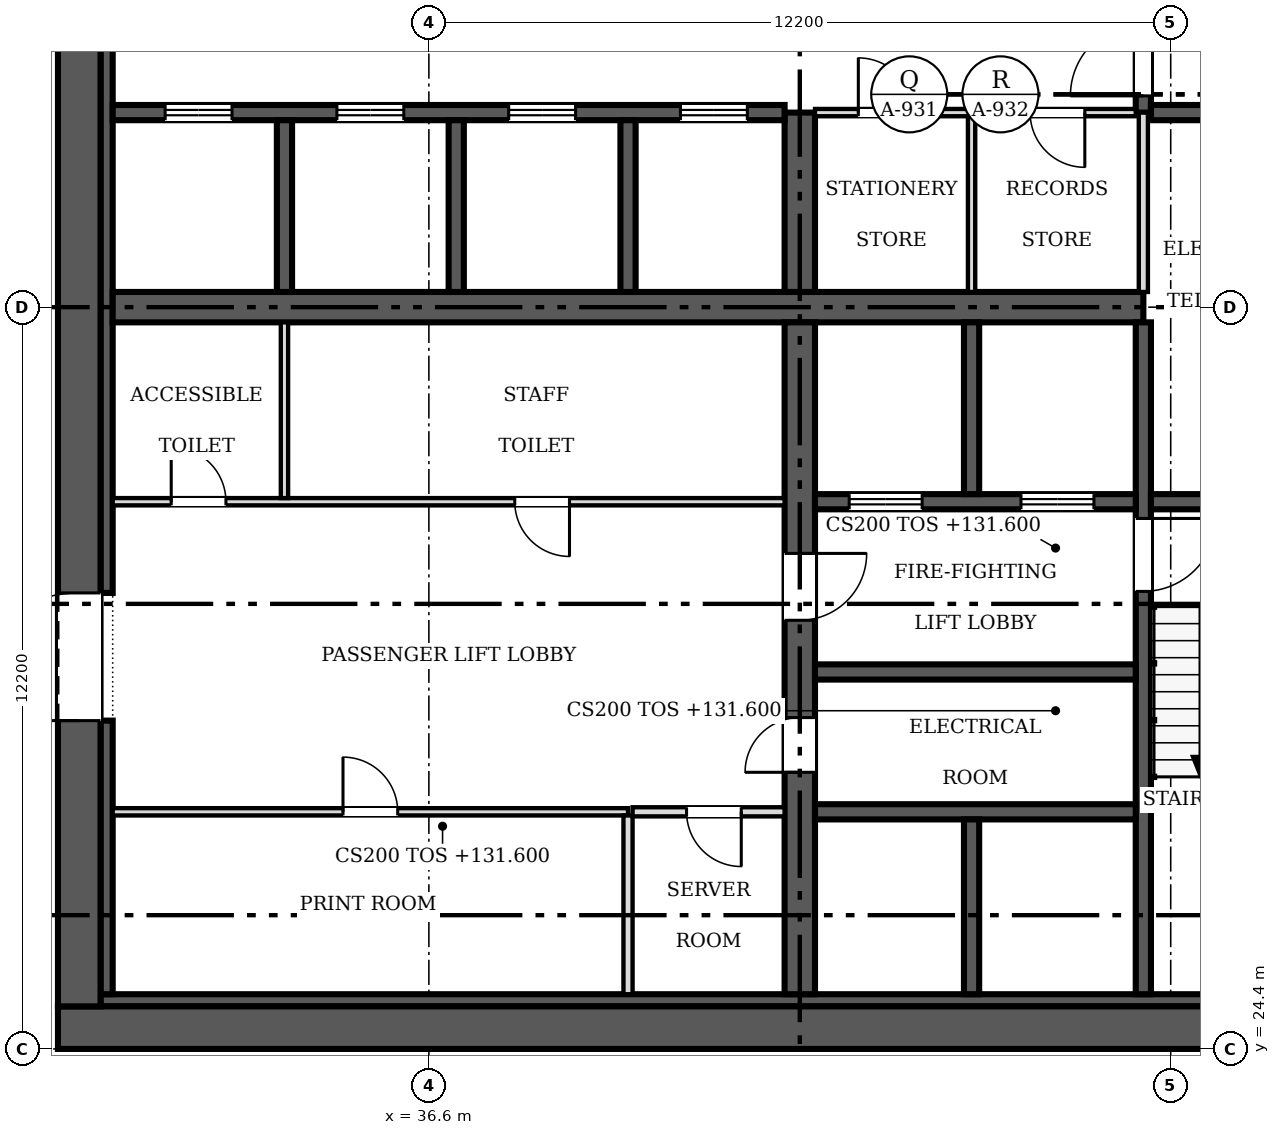
"""IFC4 building model, lengths in metres.
Left out: names, types, materials, properties, quantities, classifications, styles, units other than length and angle.
Written with IfcOpenShell. Run it as: python <this file> out.ifc"""

import sys

from ifc_helpers import new_model, si_unit, direction, frame, frame_2d, origin, place, context, subcontext, project, spatial, rectangle, extrude, source, transform, mapped, element, fill, save


model = new_model("IFC4")
c1 = context("Model", 3, precision=1e-05, world=origin(), true_north=direction((0.0, 1.0)))
c2 = subcontext(c1, "Body", "Model", "MODEL_VIEW")
j1 = project(units=[si_unit("LENGTHUNIT", "METRE"), si_unit("PLANEANGLEUNIT", "RADIAN")], contexts=[c1])
p1 = place(None, origin())
s1 = spatial("IfcSite", under=j1, at=p1, CompositionType="ELEMENT")
p2 = place(p1, origin())
s2 = spatial("IfcBuilding", under=s1, at=p2, CompositionType="ELEMENT")
p3 = place(p2, frame((0.0, 0.0, 131.6)))
s3 = spatial("IfcBuildingStorey", under=s2, at=p3, CompositionType="ELEMENT", Elevation=131.6)
p4 = place(p3, frame((54.9, 24.75, 0.0), z_axis=(0.0, 0.0, 1.0), x_axis=(-1.0, 0.0, 0.0)))
e1 = element("IfcWall", 1, at=p4, inside=s3, PredefinedType="SHEAR", context=c2, shape_type="SweptSolid", body=[
    extrude(rectangle(XDim=24.4, YDim=0.7, at=frame_2d((12.2, 0.0))), origin(), (0.0, 0.0, 1.0), 3.8),
])
m1 = source(origin(), c2, "Body", "SweptSolid", [
    extrude(rectangle(XDim=1.2, YDim=2.1, at=frame_2d((0.6, 1.05))), frame((0.0, 0.36, 0.0), z_axis=(0.0, -1.0, 0.0), x_axis=(1.0, 0.0, 0.0)), (0.0, 0.0, 1.0), 0.72),
])
p5 = place(p4, frame((1.5, 0.0, 0.0)))
e2 = element("IfcOpeningElement", 2, at=p5, cuts=e1, PredefinedType="OPENING", context=c2, shape_type="MappedRepresentation", body=[
    mapped(m1, transform((0.0, 0.0, 0.0), scale=1.0)),
])
p6 = place(p3, frame((30.85, 25.1, 0.0), z_axis=(0.0, 0.0, 1.0), x_axis=(0.0, 1.0, 0.0)))
e3 = element("IfcWall", 3, at=p6, inside=s3, PredefinedType="SHEAR", context=c2, shape_type="SweptSolid", body=[
    extrude(rectangle(XDim=23.0, YDim=0.7, at=frame_2d((11.5, 0.0))), origin(), (0.0, 0.0, 1.0), 3.8),
])
m2 = source(origin(), c2, "Body", "SweptSolid", [
    extrude(rectangle(XDim=2.1, YDim=2.4, at=frame_2d((1.05, 1.2))), frame((0.0, 0.36, 0.0), z_axis=(0.0, -1.0, 0.0), x_axis=(1.0, 0.0, 0.0)), (0.0, 0.0, 1.0), 0.72),
])
p7 = place(p6, frame((4.7, 0.0, 0.0)))
e4 = element("IfcOpeningElement", 4, at=p7, cuts=e3, PredefinedType="OPENING", context=c2, shape_type="MappedRepresentation", body=[
    mapped(m2, transform((0.0, 0.0, 0.0), scale=1.0)),
])
p8 = place(p6, frame((16.2, 0.0, 0.0)))
e5 = element("IfcOpeningElement", 5, at=p8, cuts=e3, PredefinedType="OPENING", context=c2, shape_type="MappedRepresentation", body=[
    mapped(m2, transform((0.0, 0.0, 0.0), scale=1.0)),
])
p9 = place(p3, frame((31.2, 25.2, 0.0), z_axis=(0.0, 0.0, 1.0), x_axis=(1.0, 0.0, 0.0)))
e6 = element("IfcWall", 6, at=p9, inside=s3, PredefinedType="SOLIDWALL", context=c2, shape_type="SweptSolid", body=[
    extrude(rectangle(XDim=21.0, YDim=0.2, at=frame_2d((10.5, 0.0))), origin(), (0.0, 0.0, 1.0), 3.8),
])
p10 = place(p3, frame((31.3, 25.3, 0.0), z_axis=(0.0, 0.0, 1.0), x_axis=(0.0, 1.0, 0.0)))
e7 = element("IfcWall", 7, at=p10, inside=s3, PredefinedType="SOLIDWALL", context=c2, shape_type="SweptSolid", body=[
    extrude(rectangle(XDim=4.5, YDim=0.2, at=frame_2d((2.25, 0.0))), origin(), (0.0, 0.0, 1.0), 3.8),
])
p11 = place(p3, frame((31.3, 31.9, 0.0), z_axis=(0.0, 0.0, 1.0), x_axis=(0.0, 1.0, 0.0)))
e8 = element("IfcWall", 8, at=p11, inside=s3, PredefinedType="SOLIDWALL", context=c2, shape_type="SweptSolid", body=[
    extrude(rectangle(XDim=9.4, YDim=0.2, at=frame_2d((4.7, 0.0))), origin(), (0.0, 0.0, 1.0), 3.8),
])
p12 = place(p3, frame((31.4, 36.6, 0.0), z_axis=(0.0, 0.0, 1.0), x_axis=(1.0, 0.0, 0.0)))
e9 = element("IfcWall", 9, at=p12, inside=s3, PredefinedType="SHEAR", context=c2, shape_type="SweptSolid", body=[
    extrude(rectangle(XDim=16.95, YDim=0.5, at=frame_2d((8.475, 0.0))), origin(), (0.0, 0.0, 1.0), 3.8),
])
p13 = place(p3, frame((42.7, 36.35, 0.0), z_axis=(0.0, 0.0, 1.0), x_axis=(0.0, -1.0, 0.0)))
e10 = element("IfcWall", 10, at=p13, inside=s3, PredefinedType="SHEAR", context=c2, shape_type="SweptSolid", body=[
    extrude(rectangle(XDim=11.05, YDim=0.5, at=frame_2d((5.525, 0.0))), origin(), (0.0, 0.0, 1.0), 3.8),
])
m3 = source(origin(), c2, "Body", "SweptSolid", [
    extrude(rectangle(XDim=0.9, YDim=2.1, at=frame_2d((0.45, 1.05))), frame((0.0, 0.26, 0.0), z_axis=(0.0, -1.0, 0.0), x_axis=(1.0, 0.0, 0.0)), (0.0, 0.0, 1.0), 0.52),
])
p14 = place(p13, frame((6.5, 0.0, 0.0)))
e11 = element("IfcOpeningElement", 11, at=p14, cuts=e10, PredefinedType="OPENING", context=c2, shape_type="MappedRepresentation", body=[
    mapped(m3, transform((0.0, 0.0, 0.0), scale=1.0)),
])
m4 = source(origin(), c2, "Body", "SweptSolid", [
    extrude(rectangle(XDim=1.1, YDim=2.1, at=frame_2d((0.55, 1.05))), frame((0.0, 0.26, 0.0), z_axis=(0.0, -1.0, 0.0), x_axis=(1.0, 0.0, 0.0)), (0.0, 0.0, 1.0), 0.52),
])
p15 = place(p13, frame((3.8, 0.0, 0.0)))
e12 = element("IfcOpeningElement", 12, at=p15, cuts=e10, PredefinedType="OPENING", context=c2, shape_type="MappedRepresentation", body=[
    mapped(m4, transform((0.0, 0.0, 0.0), scale=1.0)),
])
p16 = place(p3, frame((42.7, 36.85, 0.0), z_axis=(0.0, 0.0, 1.0), x_axis=(0.0, 1.0, 0.0)))
e13 = element("IfcWall", 13, at=p16, inside=s3, PredefinedType="SHEAR", context=c2, shape_type="SweptSolid", body=[
    extrude(rectangle(XDim=2.95, YDim=0.5, at=frame_2d((1.475, 0.0))), origin(), (0.0, 0.0, 1.0), 3.8),
])
p17 = place(p3, frame((31.4, 39.8, 0.0), z_axis=(0.0, 0.0, 1.0), x_axis=(1.0, 0.0, 0.0)))
e14 = element("IfcWall", 14, at=p17, inside=s3, PredefinedType="SOLIDWALL", context=c2, shape_type="SweptSolid", body=[
    extrude(rectangle(XDim=11.05, YDim=0.25, at=frame_2d((5.525, 0.0))), origin(), (0.0, 0.0, 1.0), 3.8),
])
m5 = source(origin(), c2, "Body", "SweptSolid", [
    extrude(rectangle(XDim=1.1, YDim=2.1, at=frame_2d((0.55, 1.05))), frame((0.0, 0.135, 0.0), z_axis=(0.0, -1.0, 0.0), x_axis=(1.0, 0.0, 0.0)), (0.0, 0.0, 1.0), 0.27),
])
p18 = place(p17, frame((0.863, 0.0, 0.0)))
e15 = element("IfcOpeningElement", 15, at=p18, cuts=e14, PredefinedType="OPENING", context=c2, shape_type="MappedRepresentation", body=[
    mapped(m5, transform((0.0, 0.0, 0.0), scale=1.0)),
])
p19 = place(p17, frame((3.688, 0.0, 0.0)))
e16 = element("IfcOpeningElement", 16, at=p19, cuts=e14, PredefinedType="OPENING", context=c2, shape_type="MappedRepresentation", body=[
    mapped(m5, transform((0.0, 0.0, 0.0), scale=1.0)),
])
p20 = place(p17, frame((6.512, 0.0, 0.0)))
e17 = element("IfcOpeningElement", 17, at=p20, cuts=e14, PredefinedType="OPENING", context=c2, shape_type="MappedRepresentation", body=[
    mapped(m5, transform((0.0, 0.0, 0.0), scale=1.0)),
])
p21 = place(p17, frame((9.337, 0.0, 0.0)))
e18 = element("IfcOpeningElement", 18, at=p21, cuts=e14, PredefinedType="OPENING", context=c2, shape_type="MappedRepresentation", body=[
    mapped(m5, transform((0.0, 0.0, 0.0), scale=1.0)),
])
p22 = place(p3, frame((48.35, 36.35, 0.0), z_axis=(0.0, 0.0, 1.0), x_axis=(0.0, -1.0, 0.0)))
e19 = element("IfcWall", 19, at=p22, inside=s3, PredefinedType="SOLIDWALL", context=c2, shape_type="SweptSolid", body=[
    extrude(rectangle(XDim=11.05, YDim=0.25, at=frame_2d((5.525, 0.0))), origin(), (0.0, 0.0, 1.0), 3.8),
])
m6 = source(origin(), c2, "Body", "SweptSolid", [
    extrude(rectangle(XDim=1.2, YDim=2.1, at=frame_2d((0.6, 1.05))), frame((0.0, 0.135, 0.0), z_axis=(0.0, -1.0, 0.0), x_axis=(1.0, 0.0, 0.0)), (0.0, 0.0, 1.0), 0.27),
])
p23 = place(p22, frame((3.225, 0.0, 0.0)))
e20 = element("IfcOpeningElement", 20, at=p23, cuts=e19, PredefinedType="OPENING", context=c2, shape_type="MappedRepresentation", body=[
    mapped(m6, transform((0.0, 0.0, 0.0), scale=1.0)),
])
p24 = place(p3, frame((48.225, 33.4, 0.0), z_axis=(0.0, 0.0, 1.0), x_axis=(-1.0, 0.0, 0.0)))
e21 = element("IfcWall", 21, at=p24, inside=s3, PredefinedType="SOLIDWALL", context=c2, shape_type="SweptSolid", body=[
    extrude(rectangle(XDim=5.275, YDim=0.25, at=frame_2d((2.638, 0.0))), origin(), (0.0, 0.0, 1.0), 3.8),
])
p25 = place(p24, frame((3.512, 0.0, 0.0)))
e22 = element("IfcOpeningElement", 22, at=p25, cuts=e21, PredefinedType="OPENING", context=c2, shape_type="MappedRepresentation", body=[
    mapped(m6, transform((0.0, 0.0, 0.0), scale=1.0)),
])
p26 = place(p24, frame((0.688, 0.0, 0.0)))
e23 = element("IfcOpeningElement", 23, at=p26, cuts=e21, PredefinedType="OPENING", context=c2, shape_type="MappedRepresentation", body=[
    mapped(m6, transform((0.0, 0.0, 0.0), scale=1.0)),
])
p27 = place(p3, frame((48.475, 33.4, 0.0), z_axis=(0.0, 0.0, 1.0), x_axis=(1.0, 0.0, 0.0)))
e24 = element("IfcWall", 24, at=p27, inside=s3, PredefinedType="SOLIDWALL", context=c2, shape_type="SweptSolid", body=[
    extrude(rectangle(XDim=3.525, YDim=0.25, at=frame_2d((1.762, 0.0))), origin(), (0.0, 0.0, 1.0), 3.8),
])
p28 = place(p3, frame((48.35, 47.9, 0.0), z_axis=(0.0, 0.0, 1.0), x_axis=(0.0, -1.0, 0.0)))
e25 = element("IfcWall", 25, at=p28, inside=s3, PredefinedType="SOLIDWALL", context=c2, shape_type="SweptSolid", body=[
    extrude(rectangle(XDim=8.1, YDim=0.25, at=frame_2d((4.05, 0.0))), origin(), (0.0, 0.0, 1.0), 3.8),
])
p29 = place(p28, frame((6.625, 0.0, 0.0)))
e26 = element("IfcOpeningElement", 26, at=p29, cuts=e25, PredefinedType="OPENING", context=c2, shape_type="MappedRepresentation", body=[
    mapped(m6, transform((0.0, 0.0, 0.0), scale=1.0)),
])
for number, where, z_axis, x_axis in (
    (27, (42.95, 28.3, 0.0), (0.0, 0.0, 1.0), (1.0, 0.0, 0.0)),
    (28, (42.95, 30.6, 0.0), (0.0, 0.0, 1.0), (1.0, 0.0, 0.0)),
):
    element("IfcWall", number, at=place(p3, frame(where, z_axis=z_axis, x_axis=x_axis)), inside=s3, PredefinedType="SOLIDWALL", context=c2, shape_type="SweptSolid", body=[
        extrude(rectangle(XDim=5.275, YDim=0.25, at=frame_2d((2.638, 0.0))), origin(), (0.0, 0.0, 1.0), 3.8),
    ])
p30 = place(p3, frame((48.475, 39.8, 0.0), z_axis=(0.0, 0.0, 1.0), x_axis=(1.0, 0.0, 0.0)))
e29 = element("IfcWall", 29, at=p30, inside=s3, PredefinedType="SOLIDWALL", context=c2, shape_type="SweptSolid", body=[
    extrude(rectangle(XDim=3.4, YDim=0.25, at=frame_2d((1.7, 0.0))), origin(), (0.0, 0.0, 1.0), 3.8),
])
for number, where, z_axis, x_axis in (
    (30, (34.225, 36.85, 0.0), (0.0, 0.0, 1.0), (0.0, 1.0, 0.0)),
    (31, (37.05, 36.85, 0.0), (0.0, 0.0, 1.0), (0.0, 1.0, 0.0)),
    (32, (39.875, 36.85, 0.0), (0.0, 0.0, 1.0), (0.0, 1.0, 0.0)),
):
    element("IfcWall", number, at=place(p3, frame(where, z_axis=z_axis, x_axis=x_axis)), inside=s3, PredefinedType="SOLIDWALL", context=c2, shape_type="SweptSolid", body=[
        extrude(rectangle(XDim=2.825, YDim=0.25, at=frame_2d((1.413, 0.0))), origin(), (0.0, 0.0, 1.0), 3.8),
    ])
p31 = place(p3, frame((45.525, 33.525, 0.0), z_axis=(0.0, 0.0, 1.0), x_axis=(0.0, 1.0, 0.0)))
e33 = element("IfcWall", 33, at=p31, inside=s3, PredefinedType="SOLIDWALL", context=c2, shape_type="SweptSolid", body=[
    extrude(rectangle(XDim=2.825, YDim=0.25, at=frame_2d((1.413, 0.0))), origin(), (0.0, 0.0, 1.0), 3.8),
])
p32 = place(p3, frame((45.525, 25.3, 0.0), z_axis=(0.0, 0.0, 1.0), x_axis=(0.0, 1.0, 0.0)))
e34 = element("IfcWall", 34, at=p32, inside=s3, PredefinedType="SOLIDWALL", context=c2, shape_type="SweptSolid", body=[
    extrude(rectangle(XDim=2.875, YDim=0.25, at=frame_2d((1.438, 0.0))), origin(), (0.0, 0.0, 1.0), 3.8),
])
p33 = place(p3, frame((31.4, 33.4, 0.0), z_axis=(0.0, 0.0, 1.0), x_axis=(1.0, 0.0, 0.0)))
e35 = element("IfcWall", 35, at=p33, inside=s3, PredefinedType="PARTITIONING", context=c2, shape_type="SweptSolid", body=[
    extrude(rectangle(XDim=11.05, YDim=0.12, at=frame_2d((5.525, 0.0))), origin(), (0.0, 0.0, 1.0), 3.6),
])
m7 = source(origin(), c2, "Body", "SweptSolid", [
    extrude(rectangle(XDim=0.9, YDim=2.1, at=frame_2d((0.45, 1.05))), frame((0.0, 0.07, 0.0), z_axis=(0.0, -1.0, 0.0), x_axis=(1.0, 0.0, 0.0)), (0.0, 0.0, 1.0), 0.14),
])
p34 = place(p33, frame((0.962, 0.0, 0.0)))
e36 = element("IfcOpeningElement", 36, at=p34, cuts=e35, PredefinedType="OPENING", context=c2, shape_type="MappedRepresentation", body=[
    mapped(m7, transform((0.0, 0.0, 0.0), scale=1.0)),
])
p35 = place(p33, frame((6.613, 0.0, 0.0)))
e37 = element("IfcOpeningElement", 37, at=p35, cuts=e35, PredefinedType="OPENING", context=c2, shape_type="MappedRepresentation", body=[
    mapped(m7, transform((0.0, 0.0, 0.0), scale=1.0)),
])
p36 = place(p3, frame((39.875, 28.3, 0.0), z_axis=(0.0, 0.0, 1.0), x_axis=(-1.0, 0.0, 0.0)))
e38 = element("IfcWall", 38, at=p36, inside=s3, PredefinedType="PARTITIONING", context=c2, shape_type="SweptSolid", body=[
    extrude(rectangle(XDim=8.475, YDim=0.12, at=frame_2d((4.238, 0.0))), origin(), (0.0, 0.0, 1.0), 3.6),
])
p37 = place(p36, frame((3.788, 0.0, 0.0)))
e39 = element("IfcOpeningElement", 39, at=p37, cuts=e38, PredefinedType="OPENING", context=c2, shape_type="MappedRepresentation", body=[
    mapped(m7, transform((0.0, 0.0, 0.0), scale=1.0)),
])
p38 = place(p3, frame((48.225, 39.8, 0.0), z_axis=(0.0, 0.0, 1.0), x_axis=(-1.0, 0.0, 0.0)))
e40 = element("IfcWall", 40, at=p38, inside=s3, PredefinedType="PARTITIONING", context=c2, shape_type="SweptSolid", body=[
    extrude(rectangle(XDim=5.275, YDim=0.12, at=frame_2d((2.638, 0.0))), origin(), (0.0, 0.0, 1.0), 3.6),
])
p39 = place(p38, frame((3.663, 0.0, 0.0)))
e41 = element("IfcOpeningElement", 41, at=p39, cuts=e40, PredefinedType="OPENING", context=c2, shape_type="MappedRepresentation", body=[
    mapped(m7, transform((0.0, 0.0, 0.0), scale=1.0)),
])
p40 = place(p38, frame((0.837, 0.0, 0.0)))
e42 = element("IfcOpeningElement", 42, at=p40, cuts=e40, PredefinedType="OPENING", context=c2, shape_type="MappedRepresentation", body=[
    mapped(m7, transform((0.0, 0.0, 0.0), scale=1.0)),
])
p41 = place(p3, frame((45.525, 36.85, 0.0), z_axis=(0.0, 0.0, 1.0), x_axis=(0.0, 1.0, 0.0)))
e43 = element("IfcWall", 43, at=p41, inside=s3, PredefinedType="PARTITIONING", context=c2, shape_type="SweptSolid", body=[
    extrude(rectangle(XDim=2.89, YDim=0.12, at=frame_2d((1.445, 0.0))), origin(), (0.0, 0.0, 1.0), 3.6),
])
p42 = place(p3, frame((48.35, 36.85, 0.0), z_axis=(0.0, 0.0, 1.0), x_axis=(0.0, 1.0, 0.0)))
e44 = element("IfcWall", 44, at=p42, inside=s3, PredefinedType="PARTITIONING", context=c2, shape_type="SweptSolid", body=[
    extrude(rectangle(XDim=2.95, YDim=0.15, at=frame_2d((1.475, 0.0))), origin(), (0.0, 0.0, 1.0), 3.6),
])
p43 = place(p3, frame((34.225, 33.46, 0.0), z_axis=(0.0, 0.0, 1.0), x_axis=(0.0, 1.0, 0.0)))
e45 = element("IfcWall", 45, at=p43, inside=s3, PredefinedType="PARTITIONING", context=c2, shape_type="SweptSolid", body=[
    extrude(rectangle(XDim=2.89, YDim=0.12, at=frame_2d((1.445, 0.0))), origin(), (0.0, 0.0, 1.0), 3.6),
])
p44 = place(p3, frame((39.875, 25.3, 0.0), z_axis=(0.0, 0.0, 1.0), x_axis=(0.0, 1.0, 0.0)))
e46 = element("IfcWall", 46, at=p44, inside=s3, PredefinedType="PARTITIONING", context=c2, shape_type="SweptSolid", body=[
    extrude(rectangle(XDim=2.94, YDim=0.15, at=frame_2d((1.47, 0.0))), origin(), (0.0, 0.0, 1.0), 3.6),
])
p45 = place(p3, frame((42.45, 28.3, 0.0), z_axis=(0.0, 0.0, 1.0), x_axis=(-1.0, 0.0, 0.0)))
e47 = element("IfcWall", 47, at=p45, inside=s3, PredefinedType="PARTITIONING", context=c2, shape_type="SweptSolid", body=[
    extrude(rectangle(XDim=2.5, YDim=0.15, at=frame_2d((1.25, 0.0))), origin(), (0.0, 0.0, 1.0), 3.6),
])
m8 = source(origin(), c2, "Body", "SweptSolid", [
    extrude(rectangle(XDim=0.9, YDim=2.1, at=frame_2d((0.45, 1.05))), frame((0.0, 0.085, 0.0), z_axis=(0.0, -1.0, 0.0), x_axis=(1.0, 0.0, 0.0)), (0.0, 0.0, 1.0), 0.17),
])
p46 = place(p45, frame((0.712, 0.0, 0.0)))
e48 = element("IfcOpeningElement", 48, at=p46, cuts=e47, PredefinedType="OPENING", context=c2, shape_type="MappedRepresentation", body=[
    mapped(m8, transform((0.0, 0.0, 0.0), scale=1.0)),
])
m9 = source(origin(), c2, "Body", "SweptSolid", [
    extrude(rectangle(XDim=2.1, YDim=2.4, at=frame_2d((1.05, 1.2))), frame((0.0, 0.025, 0.0), z_axis=(0.0, -1.0, 0.0), x_axis=(1.0, 0.0, 0.0)), (0.0, 0.0, 1.0), 0.05),
])
p47 = place(p7, origin())
e49 = element("IfcDoor", 49, at=p47, inside=s3, OperationType="DOUBLE_DOOR_SINGLE_SWING", PredefinedType="DOOR", context=c2, shape_type="MappedRepresentation", body=[
    mapped(m9, transform((0.0, 0.0, 0.0), scale=1.0)),
])
fill(e4, e49)
m10 = source(origin(), c2, "Body", "SweptSolid", [
    extrude(rectangle(XDim=0.9, YDim=2.1, at=frame_2d((0.45, 1.05))), frame((0.0, 0.025, 0.0), z_axis=(0.0, -1.0, 0.0), x_axis=(1.0, 0.0, 0.0)), (0.0, 0.0, 1.0), 0.05),
])
p48 = place(p14, origin())
e50 = element("IfcDoor", 50, at=p48, inside=s3, OperationType="SINGLE_SWING_RIGHT", PredefinedType="DOOR", context=c2, shape_type="MappedRepresentation", body=[
    mapped(m10, transform((0.0, 0.0, 0.0), scale=1.0)),
])
fill(e11, e50)
m11 = source(origin(), c2, "Body", "SweptSolid", [
    extrude(rectangle(XDim=1.1, YDim=2.1, at=frame_2d((0.55, 1.05))), frame((0.0, 0.025, 0.0), z_axis=(0.0, -1.0, 0.0), x_axis=(1.0, 0.0, 0.0)), (0.0, 0.0, 1.0), 0.05),
])
p49 = place(p15, origin())
e51 = element("IfcDoor", 51, at=p49, inside=s3, OperationType="SINGLE_SWING_LEFT", PredefinedType="DOOR", context=c2, shape_type="MappedRepresentation", body=[
    mapped(m11, transform((0.0, 0.0, 0.0), scale=1.0)),
])
fill(e12, e51)
p50 = place(p18, origin())
e52 = element("IfcDoor", 52, at=p50, inside=s3, OperationType="DOUBLE_DOOR_SLIDING", PredefinedType="DOOR", context=c2, shape_type="MappedRepresentation", body=[
    mapped(m11, transform((0.0, 0.0, 0.0), scale=1.0)),
])
fill(e15, e52)
p51 = place(p19, origin())
e53 = element("IfcDoor", 53, at=p51, inside=s3, OperationType="DOUBLE_DOOR_SLIDING", PredefinedType="DOOR", context=c2, shape_type="MappedRepresentation", body=[
    mapped(m11, transform((0.0, 0.0, 0.0), scale=1.0)),
])
fill(e16, e53)
p52 = place(p20, origin())
e54 = element("IfcDoor", 54, at=p52, inside=s3, OperationType="DOUBLE_DOOR_SLIDING", PredefinedType="DOOR", context=c2, shape_type="MappedRepresentation", body=[
    mapped(m11, transform((0.0, 0.0, 0.0), scale=1.0)),
])
fill(e17, e54)
p53 = place(p21, origin())
e55 = element("IfcDoor", 55, at=p53, inside=s3, OperationType="DOUBLE_DOOR_SLIDING", PredefinedType="DOOR", context=c2, shape_type="MappedRepresentation", body=[
    mapped(m11, transform((0.0, 0.0, 0.0), scale=1.0)),
])
fill(e18, e55)
m12 = source(origin(), c2, "Body", "SweptSolid", [
    extrude(rectangle(XDim=1.2, YDim=2.1, at=frame_2d((0.6, 1.05))), frame((0.0, 0.025, 0.0), z_axis=(0.0, -1.0, 0.0), x_axis=(1.0, 0.0, 0.0)), (0.0, 0.0, 1.0), 0.05),
])
p54 = place(p23, origin())
e56 = element("IfcDoor", 56, at=p54, inside=s3, OperationType="SINGLE_SWING_LEFT", PredefinedType="DOOR", context=c2, shape_type="MappedRepresentation", body=[
    mapped(m12, transform((0.0, 0.0, 0.0), scale=1.0)),
])
fill(e20, e56)
p55 = place(p25, origin())
e57 = element("IfcDoor", 57, at=p55, inside=s3, OperationType="DOUBLE_DOOR_SLIDING", PredefinedType="DOOR", context=c2, shape_type="MappedRepresentation", body=[
    mapped(m12, transform((0.0, 0.0, 0.0), scale=1.0)),
])
fill(e22, e57)
p56 = place(p26, origin())
e58 = element("IfcDoor", 58, at=p56, inside=s3, OperationType="DOUBLE_DOOR_SLIDING", PredefinedType="DOOR", context=c2, shape_type="MappedRepresentation", body=[
    mapped(m12, transform((0.0, 0.0, 0.0), scale=1.0)),
])
fill(e23, e58)
p57 = place(p29, origin())
e59 = element("IfcDoor", 59, at=p57, inside=s3, OperationType="SINGLE_SWING_RIGHT", PredefinedType="DOOR", context=c2, shape_type="MappedRepresentation", body=[
    mapped(m12, transform((0.0, 0.0, 0.0), scale=1.0)),
])
fill(e26, e59)
p58 = place(p34, origin())
e60 = element("IfcDoor", 60, at=p58, inside=s3, OperationType="SINGLE_SWING_LEFT", PredefinedType="DOOR", context=c2, shape_type="MappedRepresentation", body=[
    mapped(m10, transform((0.0, 0.0, 0.0), scale=1.0)),
])
fill(e36, e60)
p59 = place(p35, origin())
e61 = element("IfcDoor", 61, at=p59, inside=s3, OperationType="SINGLE_SWING_RIGHT", PredefinedType="DOOR", context=c2, shape_type="MappedRepresentation", body=[
    mapped(m10, transform((0.0, 0.0, 0.0), scale=1.0)),
])
fill(e37, e61)
p60 = place(p37, origin())
e62 = element("IfcDoor", 62, at=p60, inside=s3, OperationType="SINGLE_SWING_RIGHT", PredefinedType="DOOR", context=c2, shape_type="MappedRepresentation", body=[
    mapped(m10, transform((0.0, 0.0, 0.0), scale=1.0)),
])
fill(e39, e62)
p61 = place(p39, origin())
e63 = element("IfcDoor", 63, at=p61, inside=s3, OperationType="SINGLE_SWING_RIGHT", PredefinedType="DOOR", context=c2, shape_type="MappedRepresentation", body=[
    mapped(m10, transform((0.0, 0.0, 0.0), scale=1.0)),
])
fill(e41, e63)
p62 = place(p40, origin())
e64 = element("IfcDoor", 64, at=p62, inside=s3, OperationType="SINGLE_SWING_LEFT", PredefinedType="DOOR", context=c2, shape_type="MappedRepresentation", body=[
    mapped(m10, transform((0.0, 0.0, 0.0), scale=1.0)),
])
fill(e42, e64)
p63 = place(p46, origin())
e65 = element("IfcDoor", 65, at=p63, inside=s3, OperationType="SINGLE_SWING_LEFT", PredefinedType="DOOR", context=c2, shape_type="MappedRepresentation", body=[
    mapped(m10, transform((0.0, 0.0, 0.0), scale=1.0)),
])
fill(e48, e65)
save(model, sys.argv[1])
